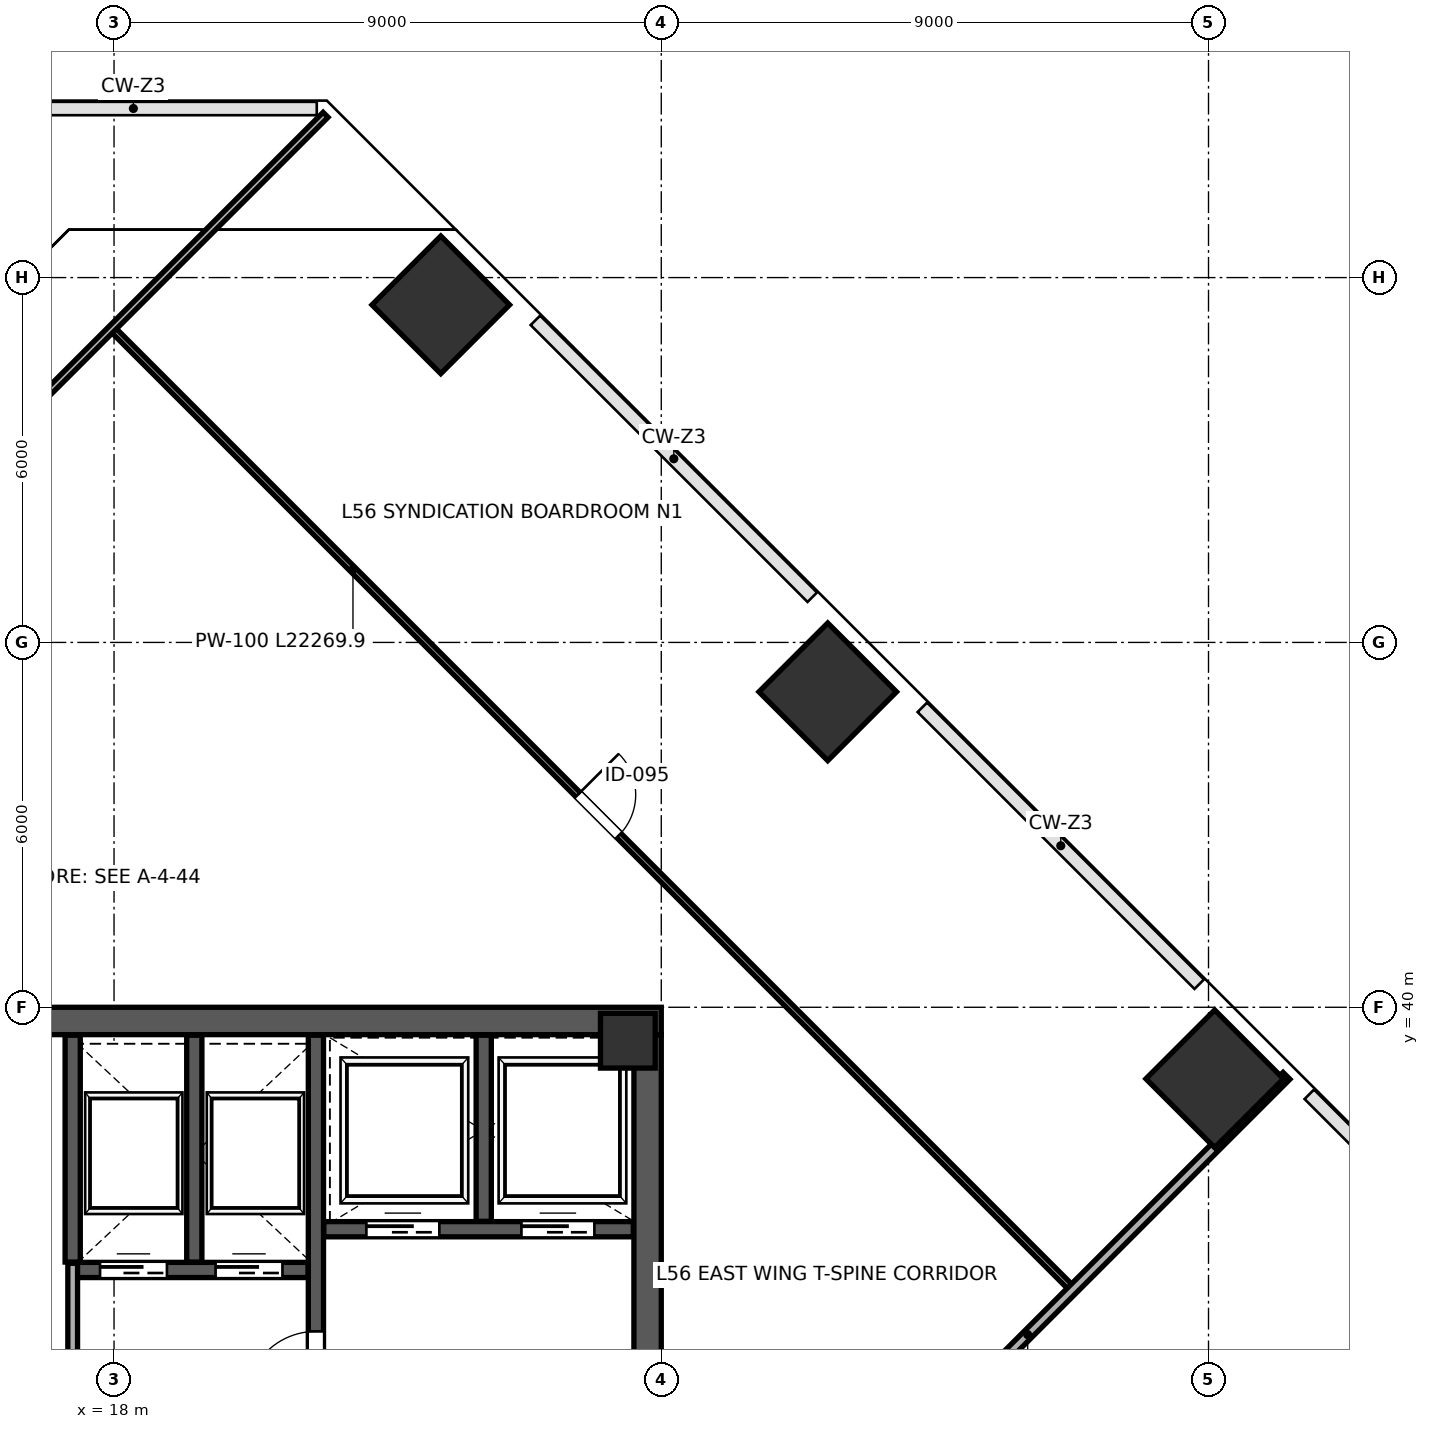
"""IFC4 building model, lengths in metres.
Left out: names, types, materials, properties, quantities, classifications, styles, units other than length and angle.
Written with IfcOpenShell. Run it as: python <this file> out.ifc"""

import sys

from ifc_helpers import new_model, si_unit, direction, frame, frame_2d, origin, origin_2d, place, context, subcontext, project, spatial, rectangle, extrude, source, transform, mapped, element, fill, save


model = new_model("IFC4")
c1 = context("Model", 3, precision=1e-05, world=origin(), true_north=direction((0.0, 1.0)))
c2 = subcontext(c1, "Body", "Model", "MODEL_VIEW")
j1 = project(units=[si_unit("LENGTHUNIT", "METRE"), si_unit("PLANEANGLEUNIT", "RADIAN")], contexts=[c1])
p1 = place(None, origin())
s1 = spatial("IfcSite", under=j1, at=p1, CompositionType="ELEMENT")
p2 = place(p1, origin())
s2 = spatial("IfcBuilding", under=s1, at=p2, CompositionType="ELEMENT")
p3 = place(p2, frame((0.0, 0.0, 250.0)))
s3 = spatial("IfcBuildingStorey", under=s2, at=p3, CompositionType="ELEMENT", Elevation=250.0)
m1 = source(origin(), c2, "Body", "SweptSolid", [
    extrude(rectangle(XDim=0.9, YDim=0.9, at=origin_2d()), origin(), (0.0, 0.0, 1.0), 4.198),
])
p4 = place(p3, frame((26.45, 39.45, 0.001), z_axis=(0.0, 0.0, 1.0), x_axis=(1.0, 0.0, 0.0)))
e1 = element("IfcColumn", 1, at=p4, inside=s3, PredefinedType="COLUMN", context=c2, shape_type="MappedRepresentation", body=[
    mapped(m1, transform((0.0, 0.0, 0.0), scale=1.0)),
])
m2 = source(origin(), c2, "Body", "SweptSolid", [
    extrude(rectangle(XDim=1.6, YDim=1.6, at=origin_2d()), origin(), (0.0, 0.0, 1.0), 4.198),
])
for number, where, z_axis, x_axis in (
    (2, (23.374, 51.552, 0.001), (0.0, 0.0, 1.0), (-0.707, 0.707, 0.0)),
    (3, (29.738, 45.188, 0.001), (0.0, 0.0, 1.0), (-0.707, 0.707, 0.0)),
    (4, (36.102, 38.823, 0.001), (0.0, 0.0, 1.0), (-0.707, 0.707, 0.0)),
):
    element("IfcColumn", number, at=place(p3, frame(where, z_axis=z_axis, x_axis=x_axis)), inside=s3, PredefinedType="COLUMN", context=c2, shape_type="MappedRepresentation", body=[
        mapped(m2, transform((0.0, 0.0, 0.0), scale=1.0)),
    ])
p5 = place(p3, frame((26.775, 24.45, 0.0), z_axis=(0.0, 0.0, 1.0), x_axis=(0.0, 1.0, 0.0)))
e5 = element("IfcWall", 5, at=p5, inside=s3, PredefinedType="SHEAR", context=c2, shape_type="SweptSolid", body=[
    extrude(rectangle(XDim=15.1, YDim=0.45, at=frame_2d((7.55, 0.0))), origin(), (0.0, 0.0, 1.0), 3.96),
])
p6 = place(p5, frame((8.6, 0.0, 0.0)))
e6 = element("IfcOpeningElement", 6, at=p6, cuts=e5, PredefinedType="OPENING", context=c2, shape_type="SweptSolid", body=[
    extrude(rectangle(XDim=1.15, YDim=2.2, at=frame_2d((0.575, 1.1))), frame((0.0, 0.235, 0.0), z_axis=(0.0, -1.0, 0.0), x_axis=(1.0, 0.0, 0.0)), (0.0, 0.0, 1.0), 0.47),
])
p7 = place(p3, frame((9.0, 39.775, 0.0), z_axis=(0.0, 0.0, 1.0), x_axis=(1.0, 0.0, 0.0)))
e7 = element("IfcWall", 7, at=p7, inside=s3, PredefinedType="SHEAR", context=c2, shape_type="SweptSolid", body=[
    extrude(rectangle(XDim=18.0, YDim=0.45, at=frame_2d((9.0, 0.0))), origin(), (0.0, 0.0, 1.0), 3.96),
])
p8 = place(p3, frame((21.32, 32.12, 0.0), z_axis=(0.0, 0.0, 1.0), x_axis=(0.0, 1.0, 0.0)))
e8 = element("IfcWall", 8, at=p8, inside=s3, PredefinedType="SHEAR", context=c2, shape_type="SweptSolid", body=[
    extrude(rectangle(XDim=7.42, YDim=0.25, at=frame_2d((3.71, 0.0))), origin(), (0.0, 0.0, 1.0), 3.96),
])
p9 = place(p8, frame((1.4, 0.0, 0.0)))
e9 = element("IfcOpeningElement", 9, at=p9, cuts=e8, PredefinedType="OPENING", context=c2, shape_type="SweptSolid", body=[
    extrude(rectangle(XDim=1.15, YDim=2.2, at=frame_2d((0.575, 1.1))), frame((0.0, 0.135, 0.0), z_axis=(0.0, -1.0, 0.0), x_axis=(1.0, 0.0, 0.0)), (0.0, 0.0, 1.0), 0.27),
])
p10 = place(p3, frame((21.45, 36.35, 0.0), z_axis=(0.0, 0.0, 1.0), x_axis=(1.0, 0.0, 0.0)))
e10 = element("IfcWall", 10, at=p10, inside=s3, PredefinedType="SHEAR", context=c2, shape_type="SweptSolid", body=[
    extrude(rectangle(XDim=5.09, YDim=0.25, at=frame_2d((2.545, 0.0))), origin(), (0.0, 0.0, 1.0), 3.96),
])
p11 = place(p10, frame((0.7, 0.0, 0.0)))
e11 = element("IfcOpeningElement", 11, at=p11, cuts=e10, PredefinedType="OPENING", context=c2, shape_type="SweptSolid", body=[
    extrude(rectangle(XDim=1.2, YDim=2.2, at=frame_2d((0.6, 1.1))), frame((0.0, 0.135, 0.0), z_axis=(0.0, -1.0, 0.0), x_axis=(1.0, 0.0, 0.0)), (0.0, 0.0, 1.0), 0.27),
])
p12 = place(p10, frame((3.25, 0.0, 0.0)))
e12 = element("IfcOpeningElement", 12, at=p12, cuts=e10, PredefinedType="OPENING", context=c2, shape_type="SweptSolid", body=[
    extrude(rectangle(XDim=1.2, YDim=2.2, at=frame_2d((0.6, 1.1))), frame((0.0, 0.135, 0.0), z_axis=(0.0, -1.0, 0.0), x_axis=(1.0, 0.0, 0.0)), (0.0, 0.0, 1.0), 0.27),
])
p13 = place(p3, frame((24.08, 36.48, 0.0), z_axis=(0.0, 0.0, 1.0), x_axis=(0.0, 1.0, 0.0)))
e13 = element("IfcWall", 13, at=p13, inside=s3, PredefinedType="SHEAR", context=c2, shape_type="SweptSolid", body=[
    extrude(rectangle(XDim=3.06, YDim=0.25, at=frame_2d((1.53, 0.0))), origin(), (0.0, 0.0, 1.0), 3.96),
])
p14 = place(p3, frame((17.32, 35.68, 0.0), z_axis=(0.0, 0.0, 1.0), x_axis=(1.0, 0.0, 0.0)))
e14 = element("IfcWall", 14, at=p14, inside=s3, PredefinedType="SHEAR", context=c2, shape_type="SweptSolid", body=[
    extrude(rectangle(XDim=3.87, YDim=0.25, at=frame_2d((1.935, 0.0))), origin(), (0.0, 0.0, 1.0), 3.96),
])
p15 = place(p14, frame((0.45, 0.0, 0.0)))
e15 = element("IfcOpeningElement", 15, at=p15, cuts=e14, PredefinedType="OPENING", context=c2, shape_type="SweptSolid", body=[
    extrude(rectangle(XDim=1.1, YDim=2.2, at=frame_2d((0.55, 1.1))), frame((0.0, 0.135, 0.0), z_axis=(0.0, -1.0, 0.0), x_axis=(1.0, 0.0, 0.0)), (0.0, 0.0, 1.0), 0.27),
])
p16 = place(p14, frame((2.35, 0.0, 0.0)))
e16 = element("IfcOpeningElement", 16, at=p16, cuts=e14, PredefinedType="OPENING", context=c2, shape_type="SweptSolid", body=[
    extrude(rectangle(XDim=1.1, YDim=2.2, at=frame_2d((0.55, 1.1))), frame((0.0, 0.135, 0.0), z_axis=(0.0, -1.0, 0.0), x_axis=(1.0, 0.0, 0.0)), (0.0, 0.0, 1.0), 0.27),
])
for number, where, z_axis, x_axis in (
    (17, (17.32, 35.81, 0.0), (0.0, 0.0, 1.0), (0.0, 1.0, 0.0)),
    (18, (19.32, 35.81, 0.0), (0.0, 0.0, 1.0), (0.0, 1.0, 0.0)),
):
    element("IfcWall", number, at=place(p3, frame(where, z_axis=z_axis, x_axis=x_axis)), inside=s3, PredefinedType="SHEAR", context=c2, shape_type="SweptSolid", body=[
        extrude(rectangle(XDim=3.73, YDim=0.25, at=frame_2d((1.865, 0.0))), origin(), (0.0, 0.0, 1.0), 3.96),
    ])
p17 = place(p3, frame((17.32, 33.86, 0.0), z_axis=(0.0, 0.0, 1.0), x_axis=(0.0, 1.0, 0.0)))
e19 = element("IfcWall", 19, at=p17, inside=s3, PredefinedType="PARTITIONING", context=c2, shape_type="SweptSolid", body=[
    extrude(rectangle(XDim=1.93, YDim=0.16, at=frame_2d((0.965, 0.0))), origin(), (0.0, 0.0, 1.0), 3.96),
])
p18 = place(p3, frame((17.993, 51.134, 0.0), z_axis=(0.0, 0.0, 1.0), x_axis=(0.707106781187, -0.707106781187, 0.0)))
e20 = element("IfcWall", 20, at=p18, inside=s3, PredefinedType="PARTITIONING", context=c2, shape_type="SweptSolid", body=[
    extrude(rectangle(XDim=22.27, YDim=0.1, at=frame_2d((11.135, 0.0))), origin(), (0.0, 0.0, 1.0), 3.96),
])
p19 = place(p18, frame((10.8, 0.0, 0.0)))
e21 = element("IfcOpeningElement", 21, at=p19, cuts=e20, PredefinedType="OPENING", context=c2, shape_type="SweptSolid", body=[
    extrude(rectangle(XDim=0.95, YDim=2.15, at=frame_2d((0.475, 1.075))), frame((0.0, 0.06, 0.0), z_axis=(0.0, -1.0, 0.0), x_axis=(1.0, 0.0, 0.0)), (0.0, 0.0, 1.0), 0.12),
])
p20 = place(p3, frame((0.775, 33.973, 0.0), z_axis=(0.0, 0.0, 1.0), x_axis=(0.707106781187, 0.707106781187, 0.0)))
e22 = element("IfcWall", 22, at=p20, inside=s3, PredefinedType="PARTITIONING", context=c2, shape_type="SweptSolid", body=[
    extrude(rectangle(XDim=29.28, YDim=0.115, at=frame_2d((14.64, 0.0))), origin(), (0.0, 0.0, 1.0), 3.96),
])
p21 = place(p20, frame((2.2, 0.0, 0.0)))
e23 = element("IfcOpeningElement", 23, at=p21, cuts=e22, PredefinedType="OPENING", context=c2, shape_type="SweptSolid", body=[
    extrude(rectangle(XDim=0.95, YDim=2.15, at=frame_2d((0.475, 1.075))), frame((0.0, 0.067, 0.0), z_axis=(0.0, -1.0, 0.0), x_axis=(1.0, 0.0, 0.0)), (0.0, 0.0, 1.0), 0.135),
])
p22 = place(p3, frame((28.769, 30.36, 0.0), z_axis=(0.0, 0.0, 1.0), x_axis=(0.707116919863, 0.707096642365, 0.0)))
e24 = element("IfcWall", 24, at=p22, inside=s3, PredefinedType="PARTITIONING", context=c2, shape_type="SweptSolid", body=[
    extrude(rectangle(XDim=12.04, YDim=0.16, at=frame_2d((6.02, 0.0))), origin(), (0.0, 0.0, 1.0), 3.195),
])
m3 = source(origin(), c2, "Body", "SweptSolid", [
    extrude(rectangle(XDim=1.15, YDim=2.2, at=frame_2d((0.575, 1.1))), frame((0.0, 0.025, 0.0), z_axis=(0.0, -1.0, 0.0), x_axis=(1.0, 0.0, 0.0)), (0.0, 0.0, 1.0), 0.05),
])
p23 = place(p9, origin())
e25 = element("IfcDoor", 25, at=p23, inside=s3, OperationType="SINGLE_SWING_LEFT", PredefinedType="DOOR", context=c2, shape_type="MappedRepresentation", body=[
    mapped(m3, transform((0.0, 0.0, 0.0), scale=1.0)),
])
fill(e9, e25)
m4 = source(origin(), c2, "Body", "SweptSolid", [
    extrude(rectangle(XDim=1.1, YDim=2.2, at=frame_2d((0.55, 1.1))), frame((0.0, 0.025, 0.0), z_axis=(0.0, -1.0, 0.0), x_axis=(1.0, 0.0, 0.0)), (0.0, 0.0, 1.0), 0.05),
])
p24 = place(p15, origin())
e26 = element("IfcDoor", 26, at=p24, inside=s3, OperationType="SLIDING_TO_LEFT", PredefinedType="DOOR", context=c2, shape_type="MappedRepresentation", body=[
    mapped(m4, transform((0.0, 0.0, 0.0), scale=1.0)),
])
fill(e15, e26)
p25 = place(p16, origin())
e27 = element("IfcDoor", 27, at=p25, inside=s3, OperationType="SLIDING_TO_RIGHT", PredefinedType="DOOR", context=c2, shape_type="MappedRepresentation", body=[
    mapped(m4, transform((0.0, 0.0, 0.0), scale=1.0)),
])
fill(e16, e27)
m5 = source(origin(), c2, "Body", "SweptSolid", [
    extrude(rectangle(XDim=1.2, YDim=2.2, at=frame_2d((0.6, 1.1))), frame((0.0, 0.025, 0.0), z_axis=(0.0, -1.0, 0.0), x_axis=(1.0, 0.0, 0.0)), (0.0, 0.0, 1.0), 0.05),
])
p26 = place(p11, origin())
e28 = element("IfcDoor", 28, at=p26, inside=s3, OperationType="SLIDING_TO_LEFT", PredefinedType="DOOR", context=c2, shape_type="MappedRepresentation", body=[
    mapped(m5, transform((0.0, 0.0, 0.0), scale=1.0)),
])
fill(e11, e28)
p27 = place(p12, origin())
e29 = element("IfcDoor", 29, at=p27, inside=s3, OperationType="SLIDING_TO_RIGHT", PredefinedType="DOOR", context=c2, shape_type="MappedRepresentation", body=[
    mapped(m5, transform((0.0, 0.0, 0.0), scale=1.0)),
])
fill(e12, e29)
m6 = source(origin(), c2, "Body", "SweptSolid", [
    extrude(rectangle(XDim=0.95, YDim=2.15, at=frame_2d((0.475, 1.075))), frame((0.0, 0.025, 0.0), z_axis=(0.0, -1.0, 0.0), x_axis=(1.0, 0.0, 0.0)), (0.0, 0.0, 1.0), 0.05),
])
p28 = place(p19, origin())
e30 = element("IfcDoor", 30, at=p28, inside=s3, OperationType="SINGLE_SWING_LEFT", PredefinedType="DOOR", context=c2, shape_type="MappedRepresentation", body=[
    mapped(m6, transform((0.0, 0.0, 0.0), scale=1.0)),
])
fill(e21, e30)
save(model, sys.argv[1])
